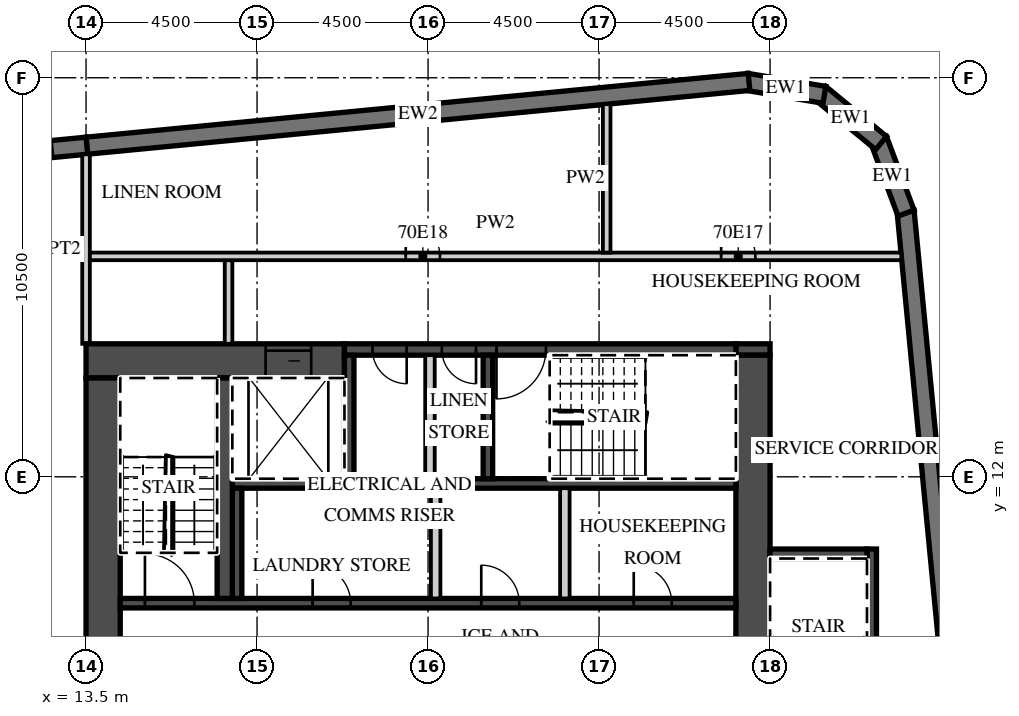
"""IFC4 building model, lengths in metres.
Left out: names, types, materials, properties, quantities, classifications, styles, units other than length and angle.
Written with IfcOpenShell. Run it as: python <this file> out.ifc"""

import sys

from ifc_helpers import new_model, si_unit, direction, frame, frame_2d, origin, place, context, subcontext, project, spatial, polyline, rectangle, outline, extrude, element, fill, save


model = new_model("IFC4")
c1 = context("Model", 3, precision=1e-05, world=origin(), true_north=direction((0.0, 1.0)))
c2 = subcontext(c1, "Body", "Model", "MODEL_VIEW")
j1 = project(units=[si_unit("LENGTHUNIT", "METRE"), si_unit("PLANEANGLEUNIT", "RADIAN")], contexts=[c1])
p1 = place(None, origin())
s1 = spatial("IfcSite", under=j1, at=p1, CompositionType="ELEMENT")
p2 = place(p1, origin())
s2 = spatial("IfcBuilding", under=s1, at=p2, CompositionType="ELEMENT")
p3 = place(p2, frame((0.0, 0.0, 281.7)))
s3 = spatial("IfcBuildingStorey", under=s2, at=p3, CompositionType="ELEMENT", Elevation=281.7)
p4 = place(p3, frame((38.132, -12.858, 0.0), z_axis=(0.0, 0.0, 1.0), x_axis=(-0.095847749461, 0.995396006082, 0.0)))
e1 = element("IfcWall", 1, at=p4, inside=s3, PredefinedType="SOLIDWALL", context=c2, shape_type="SweptSolid", body=[
    extrude(rectangle(XDim=32.0, YDim=0.45, at=frame_2d((16.0, 0.0))), origin(), (0.0, 0.0, 1.0), 3.02),
])
p5 = place(p3, frame((35.078, 18.938, 0.0), z_axis=(0.0, 0.0, 1.0), x_axis=(-0.350192909346, 0.936677599948, 0.0)))
e2 = element("IfcWall", 2, at=p5, inside=s3, PredefinedType="SOLIDWALL", context=c2, shape_type="SweptSolid", body=[
    extrude(outline(polyline([(0.0, -0.225), (2.071, -0.225), (1.95, 0.225), (0.121, 0.225), (0.0, -0.225)])), origin(), (0.0, 0.0, 1.0), 3.02),
])
p6 = place(p3, frame((34.421, 20.782, 0.0), z_axis=(0.0, 0.0, 1.0), x_axis=(-0.771593176315, 0.636116318187, 0.0)))
e3 = element("IfcWall", 3, at=p6, inside=s3, PredefinedType="SOLIDWALL", context=c2, shape_type="SweptSolid", body=[
    extrude(outline(polyline([(0.0, -0.225), (2.071, -0.225), (1.95, 0.225), (0.12, 0.225), (0.0, -0.225)])), origin(), (0.0, 0.0, 1.0), 3.02),
])
p7 = place(p3, frame((32.929, 22.051, 0.0), z_axis=(0.0, 0.0, 1.0), x_axis=(-0.986298144721, 0.164972633245, 0.0)))
e4 = element("IfcWall", 4, at=p7, inside=s3, PredefinedType="SOLIDWALL", context=c2, shape_type="SweptSolid", body=[
    extrude(outline(polyline([(0.0, -0.225), (2.07, -0.225), (1.95, 0.225), (0.121, 0.225), (0.0, -0.225)])), origin(), (0.0, 0.0, 1.0), 3.02),
])
p8 = place(p3, frame((30.946, 22.391, 0.0), z_axis=(0.0, 0.0, 1.0), x_axis=(-0.995396397117, -0.095843688398, 0.0)))
e5 = element("IfcWall", 5, at=p8, inside=s3, PredefinedType="SOLIDWALL", context=c2, shape_type="SweptSolid", body=[
    extrude(rectangle(XDim=17.505, YDim=0.45, at=frame_2d((8.752, 0.0))), origin(), (0.0, 0.0, 1.0), 3.02),
])
p9 = place(p3, frame((13.521, 20.713, 0.0), z_axis=(0.0, 0.0, 1.0), x_axis=(-0.995396277313, -0.095844932638, 0.0)))
e6 = element("IfcWall", 6, at=p9, inside=s3, PredefinedType="SOLIDWALL", context=c2, shape_type="SweptSolid", body=[
    extrude(rectangle(XDim=51.495, YDim=0.45, at=frame_2d((25.748, 0.0))), origin(), (0.0, 0.0, 1.0), 3.02),
])
p10 = place(p9, frame((0.91, 0.0, 0.45)))
e7 = element("IfcOpeningElement", 7, at=p10, cuts=e6, PredefinedType="OPENING", context=c2, shape_type="SweptSolid", body=[
    extrude(rectangle(XDim=2.7, YDim=2.25, at=frame_2d((1.35, 1.125))), frame((0.0, 0.235, 0.0), z_axis=(0.0, -1.0, 0.0), x_axis=(1.0, 0.0, 0.0)), (0.0, 0.0, 1.0), 0.47),
])
p11 = place(p9, frame((5.431, 0.0, 0.45)))
e8 = element("IfcOpeningElement", 8, at=p11, cuts=e6, PredefinedType="OPENING", context=c2, shape_type="SweptSolid", body=[
    extrude(rectangle(XDim=2.7, YDim=2.25, at=frame_2d((1.35, 1.125))), frame((0.0, 0.235, 0.0), z_axis=(0.0, -1.0, 0.0), x_axis=(1.0, 0.0, 0.0)), (0.0, 0.0, 1.0), 0.47),
])
p12 = place(p9, frame((9.952, 0.0, 0.45)))
e9 = element("IfcOpeningElement", 9, at=p12, cuts=e6, PredefinedType="OPENING", context=c2, shape_type="SweptSolid", body=[
    extrude(rectangle(XDim=2.7, YDim=2.25, at=frame_2d((1.35, 1.125))), frame((0.0, 0.235, 0.0), z_axis=(0.0, -1.0, 0.0), x_axis=(1.0, 0.0, 0.0)), (0.0, 0.0, 1.0), 0.47),
])
p13 = place(p9, frame((14.473, 0.0, 0.45)))
e10 = element("IfcOpeningElement", 10, at=p13, cuts=e6, PredefinedType="OPENING", context=c2, shape_type="SweptSolid", body=[
    extrude(rectangle(XDim=2.7, YDim=2.25, at=frame_2d((1.35, 1.125))), frame((0.0, 0.235, 0.0), z_axis=(0.0, -1.0, 0.0), x_axis=(1.0, 0.0, 0.0)), (0.0, 0.0, 1.0), 0.47),
])
p14 = place(p9, frame((18.994, 0.0, 0.45)))
e11 = element("IfcOpeningElement", 11, at=p14, cuts=e6, PredefinedType="OPENING", context=c2, shape_type="SweptSolid", body=[
    extrude(rectangle(XDim=2.7, YDim=2.25, at=frame_2d((1.35, 1.125))), frame((0.0, 0.235, 0.0), z_axis=(0.0, -1.0, 0.0), x_axis=(1.0, 0.0, 0.0)), (0.0, 0.0, 1.0), 0.47),
])
p15 = place(p9, frame((23.514, 0.0, 0.45)))
e12 = element("IfcOpeningElement", 12, at=p15, cuts=e6, PredefinedType="OPENING", context=c2, shape_type="SweptSolid", body=[
    extrude(rectangle(XDim=2.7, YDim=2.25, at=frame_2d((1.35, 1.125))), frame((0.0, 0.235, 0.0), z_axis=(0.0, -1.0, 0.0), x_axis=(1.0, 0.0, 0.0)), (0.0, 0.0, 1.0), 0.47),
])
p16 = place(p9, frame((28.035, 0.0, 0.45)))
e13 = element("IfcOpeningElement", 13, at=p16, cuts=e6, PredefinedType="OPENING", context=c2, shape_type="SweptSolid", body=[
    extrude(rectangle(XDim=2.7, YDim=2.25, at=frame_2d((1.35, 1.125))), frame((0.0, 0.235, 0.0), z_axis=(0.0, -1.0, 0.0), x_axis=(1.0, 0.0, 0.0)), (0.0, 0.0, 1.0), 0.47),
])
p17 = place(p9, frame((32.556, 0.0, 0.45)))
e14 = element("IfcOpeningElement", 14, at=p17, cuts=e6, PredefinedType="OPENING", context=c2, shape_type="SweptSolid", body=[
    extrude(rectangle(XDim=2.7, YDim=2.25, at=frame_2d((1.35, 1.125))), frame((0.0, 0.235, 0.0), z_axis=(0.0, -1.0, 0.0), x_axis=(1.0, 0.0, 0.0)), (0.0, 0.0, 1.0), 0.47),
])
p18 = place(p9, frame((37.077, 0.0, 0.45)))
e15 = element("IfcOpeningElement", 15, at=p18, cuts=e6, PredefinedType="OPENING", context=c2, shape_type="SweptSolid", body=[
    extrude(rectangle(XDim=2.7, YDim=2.25, at=frame_2d((1.35, 1.125))), frame((0.0, 0.235, 0.0), z_axis=(0.0, -1.0, 0.0), x_axis=(1.0, 0.0, 0.0)), (0.0, 0.0, 1.0), 0.47),
])
p19 = place(p9, frame((41.598, 0.0, 0.45)))
e16 = element("IfcOpeningElement", 16, at=p19, cuts=e6, PredefinedType="OPENING", context=c2, shape_type="SweptSolid", body=[
    extrude(rectangle(XDim=2.7, YDim=2.25, at=frame_2d((1.35, 1.125))), frame((0.0, 0.235, 0.0), z_axis=(0.0, -1.0, 0.0), x_axis=(1.0, 0.0, 0.0)), (0.0, 0.0, 1.0), 0.47),
])
p20 = place(p9, frame((46.118, 0.0, 0.45)))
e17 = element("IfcOpeningElement", 17, at=p20, cuts=e6, PredefinedType="OPENING", context=c2, shape_type="SweptSolid", body=[
    extrude(rectangle(XDim=2.7, YDim=2.25, at=frame_2d((1.35, 1.125))), frame((0.0, 0.235, 0.0), z_axis=(0.0, -1.0, 0.0), x_axis=(1.0, 0.0, 0.0)), (0.0, 0.0, 1.0), 0.47),
])
p21 = place(p3, frame((13.5, 15.5, 0.0), z_axis=(0.0, 0.0, 1.0), x_axis=(0.0, 1.0, 0.0)))
e18 = element("IfcWall", 18, at=p21, inside=s3, PredefinedType="PARTITIONING", context=c2, shape_type="SweptSolid", body=[
    extrude(rectangle(XDim=4.985, YDim=0.2, at=frame_2d((2.493, 0.0))), origin(), (0.0, 0.0, 1.0), 3.02),
])
p22 = place(p3, frame((13.5, 15.05, 0.0), z_axis=(0.0, 0.0, 1.0), x_axis=(1.0, 0.0, 0.0)))
e19 = element("IfcWall", 19, at=p22, inside=s3, PredefinedType="SHEAR", context=c2, shape_type="SweptSolid", body=[
    extrude(rectangle(XDim=6.8, YDim=0.9, at=frame_2d((3.4, 0.0))), origin(), (0.0, 0.0, 1.0), 3.02),
])
p23 = place(p22, frame((4.725, 0.0, 0.0)))
e20 = element("IfcOpeningElement", 20, at=p23, cuts=e19, PredefinedType="OPENING", context=c2, shape_type="SweptSolid", body=[
    extrude(rectangle(XDim=1.2, YDim=2.1, at=frame_2d((0.6, 1.05))), frame((0.0, 0.46, 0.0), z_axis=(0.0, -1.0, 0.0), x_axis=(1.0, 0.0, 0.0)), (0.0, 0.0, 1.0), 0.92),
])
p24 = place(p3, frame((30.6, 15.35, 0.0), z_axis=(0.0, 0.0, 1.0), x_axis=(1.0, 0.0, 0.0)))
e21 = element("IfcWall", 21, at=p24, inside=s3, PredefinedType="SHEAR", context=c2, shape_type="SweptSolid", body=[
    extrude(rectangle(XDim=0.9, YDim=0.3, at=frame_2d((0.45, 0.0))), origin(), (0.0, 0.0, 1.0), 3.02),
])
p25 = place(p3, frame((20.3, 15.35, 0.0), z_axis=(0.0, 0.0, 1.0), x_axis=(1.0, 0.0, 0.0)))
e22 = element("IfcWall", 22, at=p25, inside=s3, PredefinedType="SHEAR", context=c2, shape_type="SweptSolid", body=[
    extrude(rectangle(XDim=10.3, YDim=0.3, at=frame_2d((5.15, 0.0))), origin(), (0.0, 0.0, 1.0), 3.02),
])
p26 = place(p25, frame((4.0, 0.0, 0.0)))
e23 = element("IfcOpeningElement", 23, at=p26, cuts=e22, PredefinedType="OPENING", context=c2, shape_type="SweptSolid", body=[
    extrude(rectangle(XDim=1.3, YDim=2.1, at=frame_2d((0.65, 1.05))), frame((0.0, 0.16, 0.0), z_axis=(0.0, -1.0, 0.0), x_axis=(1.0, 0.0, 0.0)), (0.0, 0.0, 1.0), 0.32),
])
p27 = place(p25, frame((2.562, 0.0, 0.0)))
e24 = element("IfcOpeningElement", 24, at=p27, cuts=e22, PredefinedType="OPENING", context=c2, shape_type="SweptSolid", body=[
    extrude(rectangle(XDim=0.9, YDim=2.1, at=frame_2d((0.45, 1.05))), frame((0.0, 0.16, 0.0), z_axis=(0.0, -1.0, 0.0), x_axis=(1.0, 0.0, 0.0)), (0.0, 0.0, 1.0), 0.32),
])
p28 = place(p25, frame((0.738, 0.0, 0.0)))
e25 = element("IfcOpeningElement", 25, at=p28, cuts=e22, PredefinedType="OPENING", context=c2, shape_type="SweptSolid", body=[
    extrude(rectangle(XDim=0.9, YDim=2.1, at=frame_2d((0.45, 1.05))), frame((0.0, 0.16, 0.0), z_axis=(0.0, -1.0, 0.0), x_axis=(1.0, 0.0, 0.0)), (0.0, 0.0, 1.0), 0.32),
])
p29 = place(p3, frame((31.05, 2.4, 0.0), z_axis=(0.0, 0.0, 1.0), x_axis=(0.0, 1.0, 0.0)))
e26 = element("IfcWall", 26, at=p29, inside=s3, PredefinedType="SHEAR", context=c2, shape_type="SweptSolid", body=[
    extrude(rectangle(XDim=12.8, YDim=0.9, at=frame_2d((6.4, 0.0))), origin(), (0.0, 0.0, 1.0), 3.02),
])
p30 = place(p29, frame((0.2, 0.0, 0.0)))
e27 = element("IfcOpeningElement", 27, at=p30, cuts=e26, PredefinedType="OPENING", context=c2, shape_type="SweptSolid", body=[
    extrude(rectangle(XDim=1.1, YDim=2.1, at=frame_2d((0.55, 1.05))), frame((0.0, 0.46, 0.0), z_axis=(0.0, -1.0, 0.0), x_axis=(1.0, 0.0, 0.0)), (0.0, 0.0, 1.0), 0.92),
])
p31 = place(p3, frame((13.95, 2.4, 0.0), z_axis=(0.0, 0.0, 1.0), x_axis=(0.0, 1.0, 0.0)))
e28 = element("IfcWall", 28, at=p31, inside=s3, PredefinedType="SHEAR", context=c2, shape_type="SweptSolid", body=[
    extrude(rectangle(XDim=12.2, YDim=0.9, at=frame_2d((6.1, 0.0))), origin(), (0.0, 0.0, 1.0), 3.02),
])
p32 = place(p3, frame((14.4, 8.675, 0.0), z_axis=(0.0, 0.0, 1.0), x_axis=(1.0, 0.0, 0.0)))
e29 = element("IfcWall", 29, at=p32, inside=s3, PredefinedType="SHEAR", context=c2, shape_type="SweptSolid", body=[
    extrude(rectangle(XDim=16.2, YDim=0.25, at=frame_2d((8.1, 0.0))), origin(), (0.0, 0.0, 1.0), 3.02),
])
p33 = place(p32, frame((0.65, 0.0, 0.0)))
e30 = element("IfcOpeningElement", 30, at=p33, cuts=e29, PredefinedType="OPENING", context=c2, shape_type="SweptSolid", body=[
    extrude(rectangle(XDim=1.3, YDim=2.1, at=frame_2d((0.65, 1.05))), frame((0.0, 0.135, 0.0), z_axis=(0.0, -1.0, 0.0), x_axis=(1.0, 0.0, 0.0)), (0.0, 0.0, 1.0), 0.27),
])
p34 = place(p32, frame((13.512, 0.0, 0.0)))
e31 = element("IfcOpeningElement", 31, at=p34, cuts=e29, PredefinedType="OPENING", context=c2, shape_type="SweptSolid", body=[
    extrude(rectangle(XDim=1.0, YDim=2.1, at=frame_2d((0.5, 1.05))), frame((0.0, 0.135, 0.0), z_axis=(0.0, -1.0, 0.0), x_axis=(1.0, 0.0, 0.0)), (0.0, 0.0, 1.0), 0.27),
])
p35 = place(p32, frame((9.5, 0.0, 0.0)))
e32 = element("IfcOpeningElement", 32, at=p35, cuts=e29, PredefinedType="OPENING", context=c2, shape_type="SweptSolid", body=[
    extrude(rectangle(XDim=1.0, YDim=2.1, at=frame_2d((0.5, 1.05))), frame((0.0, 0.135, 0.0), z_axis=(0.0, -1.0, 0.0), x_axis=(1.0, 0.0, 0.0)), (0.0, 0.0, 1.0), 0.27),
])
p36 = place(p32, frame((5.062, 0.0, 0.0)))
e33 = element("IfcOpeningElement", 33, at=p36, cuts=e29, PredefinedType="OPENING", context=c2, shape_type="SweptSolid", body=[
    extrude(rectangle(XDim=1.0, YDim=2.1, at=frame_2d((0.5, 1.05))), frame((0.0, 0.135, 0.0), z_axis=(0.0, -1.0, 0.0), x_axis=(1.0, 0.0, 0.0)), (0.0, 0.0, 1.0), 0.27),
])
p37 = place(p3, frame((17.35, 11.825, 0.0), z_axis=(0.0, 0.0, 1.0), x_axis=(1.0, 0.0, 0.0)))
e34 = element("IfcWall", 34, at=p37, inside=s3, PredefinedType="SHEAR", context=c2, shape_type="SweptSolid", body=[
    extrude(rectangle(XDim=13.25, YDim=0.25, at=frame_2d((6.625, 0.0))), origin(), (0.0, 0.0, 1.0), 3.02),
])
p38 = place(p3, frame((17.475, 8.8, 0.0), z_axis=(0.0, 0.0, 1.0), x_axis=(0.0, 1.0, 0.0)))
e35 = element("IfcWall", 35, at=p38, inside=s3, PredefinedType="SHEAR", context=c2, shape_type="SweptSolid", body=[
    extrude(rectangle(XDim=2.9, YDim=0.25, at=frame_2d((1.45, 0.0))), origin(), (0.0, 0.0, 1.0), 3.02),
])
for number, where, z_axis, x_axis in (
    (36, (26.1, 8.8, 0.0), (0.0, 0.0, 1.0), (0.0, 1.0, 0.0)),
    (37, (22.7, 8.8, 0.0), (0.0, 0.0, 1.0), (0.0, 1.0, 0.0)),
):
    element("IfcWall", number, at=place(p3, frame(where, z_axis=z_axis, x_axis=x_axis)), inside=s3, PredefinedType="PARTITIONING", context=c2, shape_type="SweptSolid", body=[
        extrude(rectangle(XDim=2.9, YDim=0.25, at=frame_2d((1.45, 0.0))), origin(), (0.0, 0.0, 1.0), 3.02),
    ])
p39 = place(p3, frame((17.15, 8.8, 0.0), z_axis=(0.0, 0.0, 1.0), x_axis=(0.0, 1.0, 0.0)))
e38 = element("IfcWall", 38, at=p39, inside=s3, PredefinedType="SHEAR", context=c2, shape_type="SweptSolid", body=[
    extrude(rectangle(XDim=5.8, YDim=0.4, at=frame_2d((2.9, 0.0))), origin(), (0.0, 0.0, 1.0), 3.02),
])
for number, where, z_axis, x_axis in (
    (39, (20.425, 11.95, 0.0), (0.0, 0.0, 1.0), (0.0, 1.0, 0.0)),
    (40, (24.075, 11.95, 0.0), (0.0, 0.0, 1.0), (0.0, 1.0, 0.0)),
):
    element("IfcWall", number, at=place(p3, frame(where, z_axis=z_axis, x_axis=x_axis)), inside=s3, PredefinedType="SHEAR", context=c2, shape_type="SweptSolid", body=[
        extrude(rectangle(XDim=3.25, YDim=0.25, at=frame_2d((1.625, 0.0))), origin(), (0.0, 0.0, 1.0), 3.02),
    ])
p40 = place(p3, frame((22.55, 11.95, 0.0), z_axis=(0.0, 0.0, 1.0), x_axis=(0.0, 1.0, 0.0)))
e41 = element("IfcWall", 41, at=p40, inside=s3, PredefinedType="PARTITIONING", context=c2, shape_type="SweptSolid", body=[
    extrude(rectangle(XDim=3.25, YDim=0.25, at=frame_2d((1.625, 0.0))), origin(), (0.0, 0.0, 1.0), 3.02),
])
p41 = place(p3, frame((34.175, 1.75, 0.0), z_axis=(0.0, 0.0, 1.0), x_axis=(0.0, 1.0, 0.0)))
e42 = element("IfcWall", 42, at=p41, inside=s3, PredefinedType="SHEAR", context=c2, shape_type="SweptSolid", body=[
    extrude(rectangle(XDim=8.35, YDim=0.25, at=frame_2d((4.175, 0.0))), origin(), (0.0, 0.0, 1.0), 3.02),
])
p42 = place(p3, frame((31.5, 9.975, 0.0), z_axis=(0.0, 0.0, 1.0), x_axis=(1.0, 0.0, 0.0)))
e43 = element("IfcWall", 43, at=p42, inside=s3, PredefinedType="SHEAR", context=c2, shape_type="SweptSolid", body=[
    extrude(rectangle(XDim=2.55, YDim=0.25, at=frame_2d((1.275, 0.0))), origin(), (0.0, 0.0, 1.0), 3.02),
])
p43 = place(p3, frame((17.25, 15.5, 0.0), z_axis=(0.0, 0.0, 1.0), x_axis=(0.0, 1.0, 0.0)))
e44 = element("IfcWall", 44, at=p43, inside=s3, PredefinedType="PARTITIONING", context=c2, shape_type="SweptSolid", body=[
    extrude(rectangle(XDim=2.2, YDim=0.2, at=frame_2d((1.1, 0.0))), origin(), (0.0, 0.0, 1.0), 3.02),
])
p44 = place(p3, frame((13.6, 17.8, 0.0), z_axis=(0.0, 0.0, 1.0), x_axis=(1.0, 0.0, 0.0)))
e45 = element("IfcWall", 45, at=p44, inside=s3, PredefinedType="PARTITIONING", context=c2, shape_type="SweptSolid", body=[
    extrude(rectangle(XDim=21.354, YDim=0.2, at=frame_2d((10.677, 0.0))), origin(), (0.0, 0.0, 1.0), 3.02),
])
p45 = place(p44, frame((16.613, 0.0, 0.0)))
e46 = element("IfcOpeningElement", 46, at=p45, cuts=e45, PredefinedType="OPENING", context=c2, shape_type="SweptSolid", body=[
    extrude(rectangle(XDim=0.9, YDim=2.1, at=frame_2d((0.45, 1.05))), frame((0.0, 0.11, 0.0), z_axis=(0.0, -1.0, 0.0), x_axis=(1.0, 0.0, 0.0)), (0.0, 0.0, 1.0), 0.22),
])
p46 = place(p44, frame((8.312, 0.0, 0.0)))
e47 = element("IfcOpeningElement", 47, at=p46, cuts=e45, PredefinedType="OPENING", context=c2, shape_type="SweptSolid", body=[
    extrude(rectangle(XDim=0.9, YDim=2.1, at=frame_2d((0.45, 1.05))), frame((0.0, 0.11, 0.0), z_axis=(0.0, -1.0, 0.0), x_axis=(1.0, 0.0, 0.0)), (0.0, 0.0, 1.0), 0.22),
])
p47 = place(p3, frame((27.2, 17.9, 0.0), z_axis=(0.0, 0.0, 1.0), x_axis=(0.0, 1.0, 0.0)))
e48 = element("IfcWall", 48, at=p47, inside=s3, PredefinedType="PARTITIONING", context=c2, shape_type="SweptSolid", body=[
    extrude(rectangle(XDim=3.905, YDim=0.2, at=frame_2d((1.953, 0.0))), origin(), (0.0, 0.0, 1.0), 3.02),
])
p48 = place(p10, origin())
e49 = element("IfcWindow", 49, at=p48, inside=s3, PartitioningType="SINGLE_PANEL", PredefinedType="WINDOW", context=c2, shape_type="SweptSolid", body=[
    extrude(rectangle(XDim=2.7, YDim=2.25, at=frame_2d((1.35, 1.125))), frame((0.0, 0.09, 0.0), z_axis=(0.0, -1.0, 0.0), x_axis=(1.0, 0.0, 0.0)), (0.0, 0.0, 1.0), 0.06),
])
fill(e7, e49)
p49 = place(p23, origin())
e50 = element("IfcDoor", 50, at=p49, inside=s3, OperationType="SLIDING_TO_LEFT", PredefinedType="DOOR", context=c2, shape_type="SweptSolid", body=[
    extrude(rectangle(XDim=1.2, YDim=2.1, at=frame_2d((0.6, 1.05))), frame((0.0, 0.025, 0.0), z_axis=(0.0, -1.0, 0.0), x_axis=(1.0, 0.0, 0.0)), (0.0, 0.0, 1.0), 0.05),
])
fill(e20, e50)
p50 = place(p33, origin())
e51 = element("IfcDoor", 51, at=p50, inside=s3, OperationType="SINGLE_SWING_LEFT", PredefinedType="DOOR", context=c2, shape_type="SweptSolid", body=[
    extrude(rectangle(XDim=1.3, YDim=2.1, at=frame_2d((0.65, 1.05))), frame((0.0, 0.025, 0.0), z_axis=(0.0, -1.0, 0.0), x_axis=(1.0, 0.0, 0.0)), (0.0, 0.0, 1.0), 0.05),
])
fill(e30, e51)
p51 = place(p26, origin())
e52 = element("IfcDoor", 52, at=p51, inside=s3, OperationType="SINGLE_SWING_LEFT", PredefinedType="DOOR", context=c2, shape_type="SweptSolid", body=[
    extrude(rectangle(XDim=1.3, YDim=2.1, at=frame_2d((0.65, 1.05))), frame((0.0, 0.025, 0.0), z_axis=(0.0, -1.0, 0.0), x_axis=(1.0, 0.0, 0.0)), (0.0, 0.0, 1.0), 0.05),
])
fill(e23, e52)
p52 = place(p27, origin())
e53 = element("IfcDoor", 53, at=p52, inside=s3, OperationType="SINGLE_SWING_RIGHT", PredefinedType="DOOR", context=c2, shape_type="SweptSolid", body=[
    extrude(rectangle(XDim=0.9, YDim=2.1, at=frame_2d((0.45, 1.05))), frame((0.0, 0.025, 0.0), z_axis=(0.0, -1.0, 0.0), x_axis=(1.0, 0.0, 0.0)), (0.0, 0.0, 1.0), 0.05),
])
fill(e24, e53)
p53 = place(p28, origin())
e54 = element("IfcDoor", 54, at=p53, inside=s3, OperationType="SINGLE_SWING_RIGHT", PredefinedType="DOOR", context=c2, shape_type="SweptSolid", body=[
    extrude(rectangle(XDim=0.9, YDim=2.1, at=frame_2d((0.45, 1.05))), frame((0.0, 0.025, 0.0), z_axis=(0.0, -1.0, 0.0), x_axis=(1.0, 0.0, 0.0)), (0.0, 0.0, 1.0), 0.05),
])
fill(e25, e54)
p54 = place(p34, origin())
e55 = element("IfcDoor", 55, at=p54, inside=s3, OperationType="SINGLE_SWING_LEFT", PredefinedType="DOOR", context=c2, shape_type="SweptSolid", body=[
    extrude(rectangle(XDim=1.0, YDim=2.1, at=frame_2d((0.5, 1.05))), frame((0.0, 0.025, 0.0), z_axis=(0.0, -1.0, 0.0), x_axis=(1.0, 0.0, 0.0)), (0.0, 0.0, 1.0), 0.05),
])
fill(e31, e55)
p55 = place(p35, origin())
e56 = element("IfcDoor", 56, at=p55, inside=s3, OperationType="SINGLE_SWING_LEFT", PredefinedType="DOOR", context=c2, shape_type="SweptSolid", body=[
    extrude(rectangle(XDim=1.0, YDim=2.1, at=frame_2d((0.5, 1.05))), frame((0.0, 0.025, 0.0), z_axis=(0.0, -1.0, 0.0), x_axis=(1.0, 0.0, 0.0)), (0.0, 0.0, 1.0), 0.05),
])
fill(e32, e56)
p56 = place(p36, origin())
e57 = element("IfcDoor", 57, at=p56, inside=s3, OperationType="SINGLE_SWING_LEFT", PredefinedType="DOOR", context=c2, shape_type="SweptSolid", body=[
    extrude(rectangle(XDim=1.0, YDim=2.1, at=frame_2d((0.5, 1.05))), frame((0.0, 0.025, 0.0), z_axis=(0.0, -1.0, 0.0), x_axis=(1.0, 0.0, 0.0)), (0.0, 0.0, 1.0), 0.05),
])
fill(e33, e57)
p57 = place(p45, origin())
e58 = element("IfcDoor", 58, at=p57, inside=s3, OperationType="SINGLE_SWING_LEFT", PredefinedType="DOOR", context=c2, shape_type="SweptSolid", body=[
    extrude(rectangle(XDim=0.9, YDim=2.1, at=frame_2d((0.45, 1.05))), frame((0.0, 0.025, 0.0), z_axis=(0.0, -1.0, 0.0), x_axis=(1.0, 0.0, 0.0)), (0.0, 0.0, 1.0), 0.05),
])
fill(e46, e58)
p58 = place(p46, origin())
e59 = element("IfcDoor", 59, at=p58, inside=s3, OperationType="SINGLE_SWING_LEFT", PredefinedType="DOOR", context=c2, shape_type="SweptSolid", body=[
    extrude(rectangle(XDim=0.9, YDim=2.1, at=frame_2d((0.45, 1.05))), frame((0.0, 0.025, 0.0), z_axis=(0.0, -1.0, 0.0), x_axis=(1.0, 0.0, 0.0)), (0.0, 0.0, 1.0), 0.05),
])
fill(e47, e59)
save(model, sys.argv[1])
